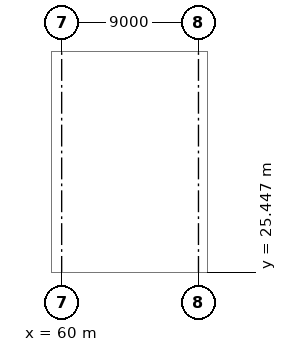
"""IFC4 building model, lengths in metres.
Left out: names, types, materials, properties, quantities, classifications, styles, units other than length and angle.
Written with IfcOpenShell. Run it as: python <this file> out.ifc"""

import sys

from ifc_helpers import new_model, si_unit, direction, frame, origin, origin_2d, place, context, subcontext, project, spatial, rectangle, extrude, element, save


model = new_model("IFC4")
c1 = context("Model", 3, precision=1e-05, world=origin(), true_north=direction((0.0, 1.0)))
c2 = subcontext(c1, "Body", "Model", "MODEL_VIEW")
j1 = project(units=[si_unit("LENGTHUNIT", "METRE"), si_unit("PLANEANGLEUNIT", "RADIAN")], contexts=[c1])
p1 = place(None, origin())
s1 = spatial("IfcSite", under=j1, at=p1, CompositionType="ELEMENT")
p2 = place(p1, origin())
s2 = spatial("IfcBuilding", under=s1, at=p2, CompositionType="ELEMENT")
p3 = place(p2, origin())
s3 = spatial("IfcBuildingStorey", under=s2, at=p3, CompositionType="ELEMENT", Elevation=0.0)
for number, where, z_axis, x_axis in (
    (1, (60.0, 33.7, -0.3), (0.0, 0.0, 1.0), (1.0, 0.0, 0.0)),
    (2, (69.0, 33.7, -0.3), (0.0, 0.0, 1.0), (1.0, 0.0, 0.0)),
):
    element("IfcColumn", number, at=place(p3, frame(where, z_axis=z_axis, x_axis=x_axis)), inside=s3, PredefinedType="COLUMN", context=c2, shape_type="SweptSolid", body=[
        extrude(rectangle(XDim=1.0, YDim=1.4, at=origin_2d()), origin(), (0.0, 0.0, 1.0), 5.3),
    ])
save(model, sys.argv[1])
